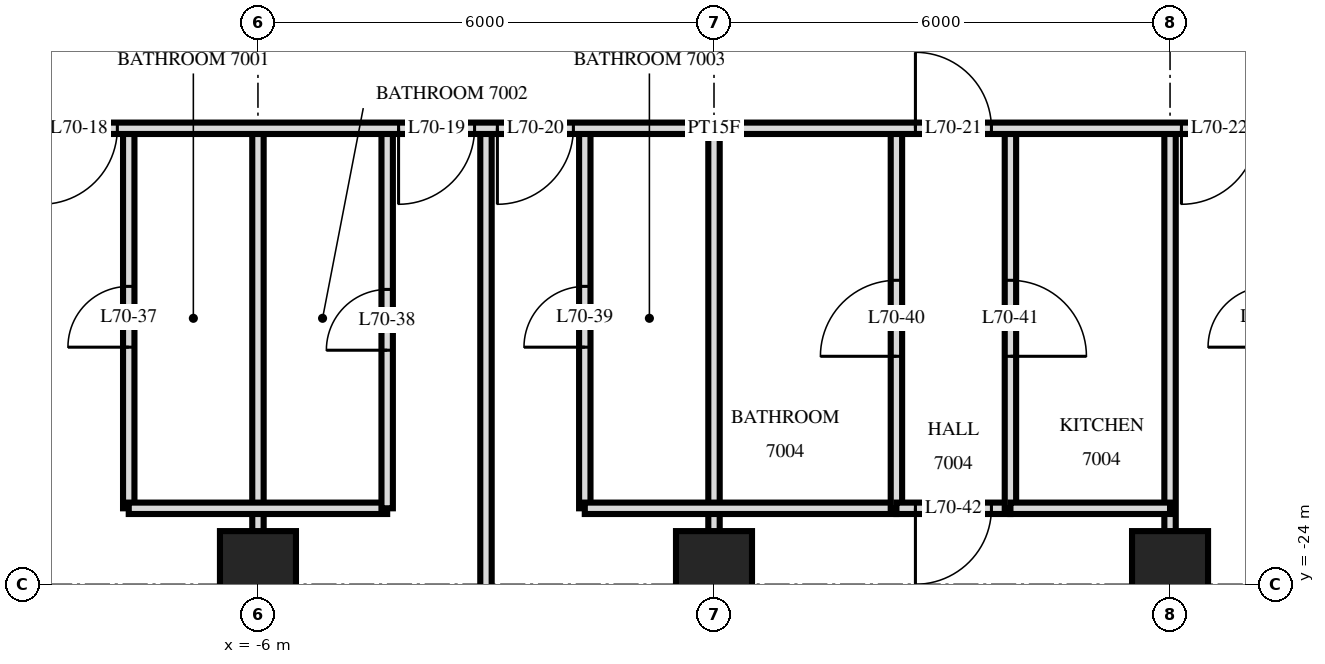
"""IFC4 building model, lengths in metres.
Left out: names, types, materials, properties, quantities, classifications, styles, units other than length and angle.
Written with IfcOpenShell. Run it as: python <this file> out.ifc"""

import sys

from ifc_helpers import new_model, si_unit, direction, frame, frame_2d, origin, origin_2d, place, context, subcontext, project, spatial, rectangle, extrude, element, fill, save


model = new_model("IFC4")
c1 = context("Model", 3, precision=1e-05, world=origin(), true_north=direction((0.0, 1.0)))
c2 = subcontext(c1, "Body", "Model", "MODEL_VIEW")
j1 = project(units=[si_unit("LENGTHUNIT", "METRE"), si_unit("PLANEANGLEUNIT", "RADIAN")], contexts=[c1])
p1 = place(None, origin())
s1 = spatial("IfcSite", under=j1, at=p1, CompositionType="ELEMENT")
p2 = place(p1, origin())
s2 = spatial("IfcBuilding", under=s1, at=p2, CompositionType="ELEMENT")
p3 = place(p2, frame((0.0, 0.0, 266.6)))
s3 = spatial("IfcBuildingStorey", under=s2, at=p3, CompositionType="ELEMENT", Elevation=266.6)
for number, where, z_axis, x_axis in (
    (1, (-6.0, -23.8, 0.0), (0.0, 0.0, 1.0), (1.0, 0.0, 0.0)),
    (2, (0.0, -23.8, 0.0), (0.0, 0.0, 1.0), (1.0, 0.0, 0.0)),
    (3, (6.0, -23.8, 0.0), (0.0, 0.0, 1.0), (1.0, 0.0, 0.0)),
):
    element("IfcColumn", number, at=place(p3, frame(where, z_axis=z_axis, x_axis=x_axis)), inside=s3, PredefinedType="COLUMN", context=c2, shape_type="SweptSolid", body=[
        extrude(rectangle(XDim=1.0, YDim=1.0, at=origin_2d()), origin(), (0.0, 0.0, 1.0), 3.5),
    ])
p4 = place(p3, frame((6.0, -33.62, 0.0), z_axis=(0.0, 0.0, 1.0), x_axis=(0.0, 1.0, 0.0)))
e4 = element("IfcWall", 4, at=p4, inside=s3, PredefinedType="PARTITIONING", context=c2, shape_type="SweptSolid", body=[
    extrude(rectangle(XDim=15.62, YDim=0.15, at=frame_2d((7.81, 0.0))), origin(), (0.0, 0.0, 1.0), 3.22),
])
p5 = place(p3, frame((3.9, -23.0, 0.0), z_axis=(0.0, 0.0, 1.0), x_axis=(0.0, 1.0, 0.0)))
e5 = element("IfcWall", 5, at=p5, inside=s3, PredefinedType="PARTITIONING", context=c2, shape_type="SweptSolid", body=[
    extrude(rectangle(XDim=5.0, YDim=0.15, at=frame_2d((2.5, 0.0))), origin(), (0.0, 0.0, 1.0), 3.22),
])
p6 = place(p5, frame((2.0, 0.0, 0.0)))
e6 = element("IfcOpeningElement", 6, at=p6, cuts=e5, PredefinedType="OPENING", context=c2, shape_type="SweptSolid", body=[
    extrude(rectangle(XDim=1.0, YDim=2.1, at=frame_2d((0.5, 1.05))), frame((0.0, 0.085, 0.0), z_axis=(0.0, -1.0, 0.0), x_axis=(1.0, 0.0, 0.0)), (0.0, 0.0, 1.0), 0.17),
])
p7 = place(p3, frame((2.4, -23.0, 0.0), z_axis=(0.0, 0.0, 1.0), x_axis=(0.0, 1.0, 0.0)))
e7 = element("IfcWall", 7, at=p7, inside=s3, PredefinedType="PARTITIONING", context=c2, shape_type="SweptSolid", body=[
    extrude(rectangle(XDim=5.0, YDim=0.15, at=frame_2d((2.5, 0.0))), origin(), (0.0, 0.0, 1.0), 3.22),
])
p8 = place(p7, frame((2.0, 0.0, 0.0)))
e8 = element("IfcOpeningElement", 8, at=p8, cuts=e7, PredefinedType="OPENING", context=c2, shape_type="SweptSolid", body=[
    extrude(rectangle(XDim=1.0, YDim=2.1, at=frame_2d((0.5, 1.05))), frame((0.0, 0.085, 0.0), z_axis=(0.0, -1.0, 0.0), x_axis=(1.0, 0.0, 0.0)), (0.0, 0.0, 1.0), 0.17),
])
p9 = place(p3, frame((0.0, -33.62, 0.0), z_axis=(0.0, 0.0, 1.0), x_axis=(0.0, 1.0, 0.0)))
e9 = element("IfcWall", 9, at=p9, inside=s3, PredefinedType="PARTITIONING", context=c2, shape_type="SweptSolid", body=[
    extrude(rectangle(XDim=15.62, YDim=0.15, at=frame_2d((7.81, 0.0))), origin(), (0.0, 0.0, 1.0), 3.22),
])
p10 = place(p3, frame((-1.7, -23.0, 0.0), z_axis=(0.0, 0.0, 1.0), x_axis=(0.0, 1.0, 0.0)))
e10 = element("IfcWall", 10, at=p10, inside=s3, PredefinedType="PARTITIONING", context=c2, shape_type="SweptSolid", body=[
    extrude(rectangle(XDim=5.0, YDim=0.15, at=frame_2d((2.5, 0.0))), origin(), (0.0, 0.0, 1.0), 3.22),
])
p11 = place(p10, frame((2.12, 0.0, 0.0)))
e11 = element("IfcOpeningElement", 11, at=p11, cuts=e10, PredefinedType="OPENING", context=c2, shape_type="SweptSolid", body=[
    extrude(rectangle(XDim=0.8, YDim=2.1, at=frame_2d((0.4, 1.05))), frame((0.0, 0.085, 0.0), z_axis=(0.0, -1.0, 0.0), x_axis=(1.0, 0.0, 0.0)), (0.0, 0.0, 1.0), 0.17),
])
p12 = place(p3, frame((-3.0, -33.62, 0.0), z_axis=(0.0, 0.0, 1.0), x_axis=(0.0, 1.0, 0.0)))
e12 = element("IfcWall", 12, at=p12, inside=s3, PredefinedType="PARTITIONING", context=c2, shape_type="SweptSolid", body=[
    extrude(rectangle(XDim=15.62, YDim=0.15, at=frame_2d((7.81, 0.0))), origin(), (0.0, 0.0, 1.0), 3.22),
])
p13 = place(p3, frame((-4.3, -23.0, 0.0), z_axis=(0.0, 0.0, 1.0), x_axis=(0.0, 1.0, 0.0)))
e13 = element("IfcWall", 13, at=p13, inside=s3, PredefinedType="PARTITIONING", context=c2, shape_type="SweptSolid", body=[
    extrude(rectangle(XDim=5.0, YDim=0.15, at=frame_2d((2.5, 0.0))), origin(), (0.0, 0.0, 1.0), 3.22),
])
p14 = place(p13, frame((2.08, 0.0, 0.0)))
e14 = element("IfcOpeningElement", 14, at=p14, cuts=e13, PredefinedType="OPENING", context=c2, shape_type="SweptSolid", body=[
    extrude(rectangle(XDim=0.8, YDim=2.1, at=frame_2d((0.4, 1.05))), frame((0.0, 0.085, 0.0), z_axis=(0.0, -1.0, 0.0), x_axis=(1.0, 0.0, 0.0)), (0.0, 0.0, 1.0), 0.17),
])
p15 = place(p3, frame((-6.0, -33.62, 0.0), z_axis=(0.0, 0.0, 1.0), x_axis=(0.0, 1.0, 0.0)))
e15 = element("IfcWall", 15, at=p15, inside=s3, PredefinedType="PARTITIONING", context=c2, shape_type="SweptSolid", body=[
    extrude(rectangle(XDim=15.62, YDim=0.15, at=frame_2d((7.81, 0.0))), origin(), (0.0, 0.0, 1.0), 3.22),
])
p16 = place(p3, frame((-7.7, -23.0, 0.0), z_axis=(0.0, 0.0, 1.0), x_axis=(0.0, 1.0, 0.0)))
e16 = element("IfcWall", 16, at=p16, inside=s3, PredefinedType="PARTITIONING", context=c2, shape_type="SweptSolid", body=[
    extrude(rectangle(XDim=5.0, YDim=0.15, at=frame_2d((2.5, 0.0))), origin(), (0.0, 0.0, 1.0), 3.22),
])
p17 = place(p16, frame((2.12, 0.0, 0.0)))
e17 = element("IfcOpeningElement", 17, at=p17, cuts=e16, PredefinedType="OPENING", context=c2, shape_type="SweptSolid", body=[
    extrude(rectangle(XDim=0.8, YDim=2.1, at=frame_2d((0.4, 1.05))), frame((0.0, 0.085, 0.0), z_axis=(0.0, -1.0, 0.0), x_axis=(1.0, 0.0, 0.0)), (0.0, 0.0, 1.0), 0.17),
])
p18 = place(p3, frame((2.4, -23.0, 0.0), z_axis=(0.0, 0.0, 1.0), x_axis=(1.0, 0.0, 0.0)))
e18 = element("IfcWall", 18, at=p18, inside=s3, PredefinedType="PARTITIONING", context=c2, shape_type="SweptSolid", body=[
    extrude(rectangle(XDim=1.5, YDim=0.15, at=frame_2d((0.75, 0.0))), origin(), (0.0, 0.0, 1.0), 3.22),
])
p19 = place(p18, frame((0.25, 0.0, 0.0)))
e19 = element("IfcOpeningElement", 19, at=p19, cuts=e18, PredefinedType="OPENING", context=c2, shape_type="SweptSolid", body=[
    extrude(rectangle(XDim=1.0, YDim=2.1, at=frame_2d((0.5, 1.05))), frame((0.0, 0.085, 0.0), z_axis=(0.0, -1.0, 0.0), x_axis=(1.0, 0.0, 0.0)), (0.0, 0.0, 1.0), 0.17),
])
p20 = place(p3, frame((-7.7, -23.0, 0.0), z_axis=(0.0, 0.0, 1.0), x_axis=(1.0, 0.0, 0.0)))
e20 = element("IfcWall", 20, at=p20, inside=s3, PredefinedType="PARTITIONING", context=c2, shape_type="SweptSolid", body=[
    extrude(rectangle(XDim=3.4, YDim=0.15, at=frame_2d((1.7, 0.0))), origin(), (0.0, 0.0, 1.0), 3.22),
])
p21 = place(p3, frame((-1.7, -23.0, 0.0), z_axis=(0.0, 0.0, 1.0), x_axis=(1.0, 0.0, 0.0)))
e21 = element("IfcWall", 21, at=p21, inside=s3, PredefinedType="PARTITIONING", context=c2, shape_type="SweptSolid", body=[
    extrude(rectangle(XDim=4.1, YDim=0.15, at=frame_2d((2.05, 0.0))), origin(), (0.0, 0.0, 1.0), 3.22),
])
p22 = place(p3, frame((3.9, -23.0, 0.0), z_axis=(0.0, 0.0, 1.0), x_axis=(1.0, 0.0, 0.0)))
e22 = element("IfcWall", 22, at=p22, inside=s3, PredefinedType="PARTITIONING", context=c2, shape_type="SweptSolid", body=[
    extrude(rectangle(XDim=2.1, YDim=0.15, at=frame_2d((1.05, 0.0))), origin(), (0.0, 0.0, 1.0), 3.22),
])
p23 = place(p3, frame((-22.92, -18.0, 0.0), z_axis=(0.0, 0.0, 1.0), x_axis=(1.0, 0.0, 0.0)))
e23 = element("IfcWall", 23, at=p23, inside=s3, PredefinedType="PARTITIONING", context=c2, shape_type="SweptSolid", body=[
    extrude(rectangle(XDim=45.84, YDim=0.15, at=frame_2d((22.92, 0.0))), origin(), (0.0, 0.0, 1.0), 3.22),
])
p24 = place(p23, frame((14.07, 0.0, 0.0)))
e24 = element("IfcOpeningElement", 24, at=p24, cuts=e23, PredefinedType="OPENING", context=c2, shape_type="SweptSolid", body=[
    extrude(rectangle(XDim=1.0, YDim=2.1, at=frame_2d((0.5, 1.05))), frame((0.0, 0.085, 0.0), z_axis=(0.0, -1.0, 0.0), x_axis=(1.0, 0.0, 0.0)), (0.0, 0.0, 1.0), 0.17),
])
p25 = place(p23, frame((18.77, 0.0, 0.0)))
e25 = element("IfcOpeningElement", 25, at=p25, cuts=e23, PredefinedType="OPENING", context=c2, shape_type="SweptSolid", body=[
    extrude(rectangle(XDim=1.0, YDim=2.1, at=frame_2d((0.5, 1.05))), frame((0.0, 0.085, 0.0), z_axis=(0.0, -1.0, 0.0), x_axis=(1.0, 0.0, 0.0)), (0.0, 0.0, 1.0), 0.17),
])
p26 = place(p23, frame((20.07, 0.0, 0.0)))
e26 = element("IfcOpeningElement", 26, at=p26, cuts=e23, PredefinedType="OPENING", context=c2, shape_type="SweptSolid", body=[
    extrude(rectangle(XDim=1.0, YDim=2.1, at=frame_2d((0.5, 1.05))), frame((0.0, 0.085, 0.0), z_axis=(0.0, -1.0, 0.0), x_axis=(1.0, 0.0, 0.0)), (0.0, 0.0, 1.0), 0.17),
])
p27 = place(p23, frame((25.57, 0.0, 0.0)))
e27 = element("IfcOpeningElement", 27, at=p27, cuts=e23, PredefinedType="OPENING", context=c2, shape_type="SweptSolid", body=[
    extrude(rectangle(XDim=1.0, YDim=2.1, at=frame_2d((0.5, 1.05))), frame((0.0, 0.085, 0.0), z_axis=(0.0, -1.0, 0.0), x_axis=(1.0, 0.0, 0.0)), (0.0, 0.0, 1.0), 0.17),
])
p28 = place(p23, frame((29.07, 0.0, 0.0)))
e28 = element("IfcOpeningElement", 28, at=p28, cuts=e23, PredefinedType="OPENING", context=c2, shape_type="SweptSolid", body=[
    extrude(rectangle(XDim=1.0, YDim=2.1, at=frame_2d((0.5, 1.05))), frame((0.0, 0.085, 0.0), z_axis=(0.0, -1.0, 0.0), x_axis=(1.0, 0.0, 0.0)), (0.0, 0.0, 1.0), 0.17),
])
p29 = place(p23, frame((6.37, 0.0, 0.0)))
e29 = element("IfcOpeningElement", 29, at=p29, cuts=e23, PredefinedType="OPENING", context=c2, shape_type="SweptSolid", body=[
    extrude(rectangle(XDim=1.0, YDim=2.1, at=frame_2d((0.5, 1.05))), frame((0.0, 0.085, 0.0), z_axis=(0.0, -1.0, 0.0), x_axis=(1.0, 0.0, 0.0)), (0.0, 0.0, 1.0), 0.17),
])
p30 = place(p23, frame((38.42, 0.0, 0.0)))
e30 = element("IfcOpeningElement", 30, at=p30, cuts=e23, PredefinedType="OPENING", context=c2, shape_type="SweptSolid", body=[
    extrude(rectangle(XDim=1.0, YDim=2.1, at=frame_2d((0.5, 1.05))), frame((0.0, 0.085, 0.0), z_axis=(0.0, -1.0, 0.0), x_axis=(1.0, 0.0, 0.0)), (0.0, 0.0, 1.0), 0.17),
])
p31 = place(p23, frame((43.67, 0.0, 0.0)))
e31 = element("IfcOpeningElement", 31, at=p31, cuts=e23, PredefinedType="OPENING", context=c2, shape_type="SweptSolid", body=[
    extrude(rectangle(XDim=1.0, YDim=2.1, at=frame_2d((0.5, 1.05))), frame((0.0, 0.085, 0.0), z_axis=(0.0, -1.0, 0.0), x_axis=(1.0, 0.0, 0.0)), (0.0, 0.0, 1.0), 0.17),
])
p32 = place(p24, frame((0.5, 0.0, 0.0), z_axis=(0.0, 0.0, 1.0), x_axis=(-1.0, 0.0, 0.0)))
e32 = element("IfcDoor", 32, at=p32, inside=s3, OperationType="SINGLE_SWING_LEFT", PredefinedType="DOOR", context=c2, shape_type="SweptSolid", body=[
    extrude(rectangle(XDim=1.0, YDim=2.1, at=frame_2d((0.0, 1.05))), frame((0.0, -0.025, 0.0), z_axis=(0.0, 1.0, 0.0), x_axis=(-1.0, 0.0, 0.0)), (0.0, 0.0, 1.0), 0.05),
])
fill(e24, e32)
p33 = place(p25, frame((0.5, 0.0, 0.0), z_axis=(0.0, 0.0, 1.0), x_axis=(-1.0, 0.0, 0.0)))
e33 = element("IfcDoor", 33, at=p33, inside=s3, OperationType="SINGLE_SWING_LEFT", PredefinedType="DOOR", context=c2, shape_type="SweptSolid", body=[
    extrude(rectangle(XDim=1.0, YDim=2.1, at=frame_2d((0.0, 1.05))), frame((0.0, -0.025, 0.0), z_axis=(0.0, 1.0, 0.0), x_axis=(-1.0, 0.0, 0.0)), (0.0, 0.0, 1.0), 0.05),
])
fill(e25, e33)
p34 = place(p26, frame((0.5, 0.0, 0.0), z_axis=(0.0, 0.0, 1.0), x_axis=(-1.0, 0.0, 0.0)))
e34 = element("IfcDoor", 34, at=p34, inside=s3, OperationType="SINGLE_SWING_LEFT", PredefinedType="DOOR", context=c2, shape_type="SweptSolid", body=[
    extrude(rectangle(XDim=1.0, YDim=2.1, at=frame_2d((0.0, 1.05))), frame((0.0, -0.025, 0.0), z_axis=(0.0, 1.0, 0.0), x_axis=(-1.0, 0.0, 0.0)), (0.0, 0.0, 1.0), 0.05),
])
fill(e26, e34)
p35 = place(p27, origin())
e35 = element("IfcDoor", 35, at=p35, inside=s3, OperationType="SINGLE_SWING_RIGHT", PredefinedType="DOOR", context=c2, shape_type="SweptSolid", body=[
    extrude(rectangle(XDim=1.0, YDim=2.1, at=frame_2d((0.5, 1.05))), frame((0.0, 0.025, 0.0), z_axis=(0.0, -1.0, 0.0), x_axis=(1.0, 0.0, 0.0)), (0.0, 0.0, 1.0), 0.05),
])
fill(e27, e35)
p36 = place(p28, frame((0.5, 0.0, 0.0), z_axis=(0.0, 0.0, 1.0), x_axis=(-1.0, 0.0, 0.0)))
e36 = element("IfcDoor", 36, at=p36, inside=s3, OperationType="SINGLE_SWING_LEFT", PredefinedType="DOOR", context=c2, shape_type="SweptSolid", body=[
    extrude(rectangle(XDim=1.0, YDim=2.1, at=frame_2d((0.0, 1.05))), frame((0.0, -0.025, 0.0), z_axis=(0.0, 1.0, 0.0), x_axis=(-1.0, 0.0, 0.0)), (0.0, 0.0, 1.0), 0.05),
])
fill(e28, e36)
p37 = place(p17, origin())
e37 = element("IfcDoor", 37, at=p37, inside=s3, OperationType="SINGLE_SWING_RIGHT", PredefinedType="DOOR", context=c2, shape_type="SweptSolid", body=[
    extrude(rectangle(XDim=0.8, YDim=2.1, at=frame_2d((0.4, 1.05))), frame((0.0, 0.025, 0.0), z_axis=(0.0, -1.0, 0.0), x_axis=(1.0, 0.0, 0.0)), (0.0, 0.0, 1.0), 0.05),
])
fill(e17, e37)
p38 = place(p14, origin())
e38 = element("IfcDoor", 38, at=p38, inside=s3, OperationType="SINGLE_SWING_RIGHT", PredefinedType="DOOR", context=c2, shape_type="SweptSolid", body=[
    extrude(rectangle(XDim=0.8, YDim=2.1, at=frame_2d((0.4, 1.05))), frame((0.0, 0.025, 0.0), z_axis=(0.0, -1.0, 0.0), x_axis=(1.0, 0.0, 0.0)), (0.0, 0.0, 1.0), 0.05),
])
fill(e14, e38)
p39 = place(p11, origin())
e39 = element("IfcDoor", 39, at=p39, inside=s3, OperationType="SINGLE_SWING_RIGHT", PredefinedType="DOOR", context=c2, shape_type="SweptSolid", body=[
    extrude(rectangle(XDim=0.8, YDim=2.1, at=frame_2d((0.4, 1.05))), frame((0.0, 0.025, 0.0), z_axis=(0.0, -1.0, 0.0), x_axis=(1.0, 0.0, 0.0)), (0.0, 0.0, 1.0), 0.05),
])
fill(e11, e39)
p40 = place(p8, origin())
e40 = element("IfcDoor", 40, at=p40, inside=s3, OperationType="SINGLE_SWING_RIGHT", PredefinedType="DOOR", context=c2, shape_type="SweptSolid", body=[
    extrude(rectangle(XDim=1.0, YDim=2.1, at=frame_2d((0.5, 1.05))), frame((0.0, 0.025, 0.0), z_axis=(0.0, -1.0, 0.0), x_axis=(1.0, 0.0, 0.0)), (0.0, 0.0, 1.0), 0.05),
])
fill(e8, e40)
p41 = place(p6, frame((0.5, 0.0, 0.0), z_axis=(0.0, 0.0, 1.0), x_axis=(-1.0, 0.0, 0.0)))
e41 = element("IfcDoor", 41, at=p41, inside=s3, OperationType="SINGLE_SWING_LEFT", PredefinedType="DOOR", context=c2, shape_type="SweptSolid", body=[
    extrude(rectangle(XDim=1.0, YDim=2.1, at=frame_2d((0.0, 1.05))), frame((0.0, -0.025, 0.0), z_axis=(0.0, 1.0, 0.0), x_axis=(-1.0, 0.0, 0.0)), (0.0, 0.0, 1.0), 0.05),
])
fill(e6, e41)
p42 = place(p19, frame((0.5, 0.0, 0.0), z_axis=(0.0, 0.0, 1.0), x_axis=(-1.0, 0.0, 0.0)))
e42 = element("IfcDoor", 42, at=p42, inside=s3, OperationType="SINGLE_SWING_LEFT", PredefinedType="DOOR", context=c2, shape_type="SweptSolid", body=[
    extrude(rectangle(XDim=1.0, YDim=2.1, at=frame_2d((0.0, 1.05))), frame((0.0, -0.025, 0.0), z_axis=(0.0, 1.0, 0.0), x_axis=(-1.0, 0.0, 0.0)), (0.0, 0.0, 1.0), 0.05),
])
fill(e19, e42)
save(model, sys.argv[1])
